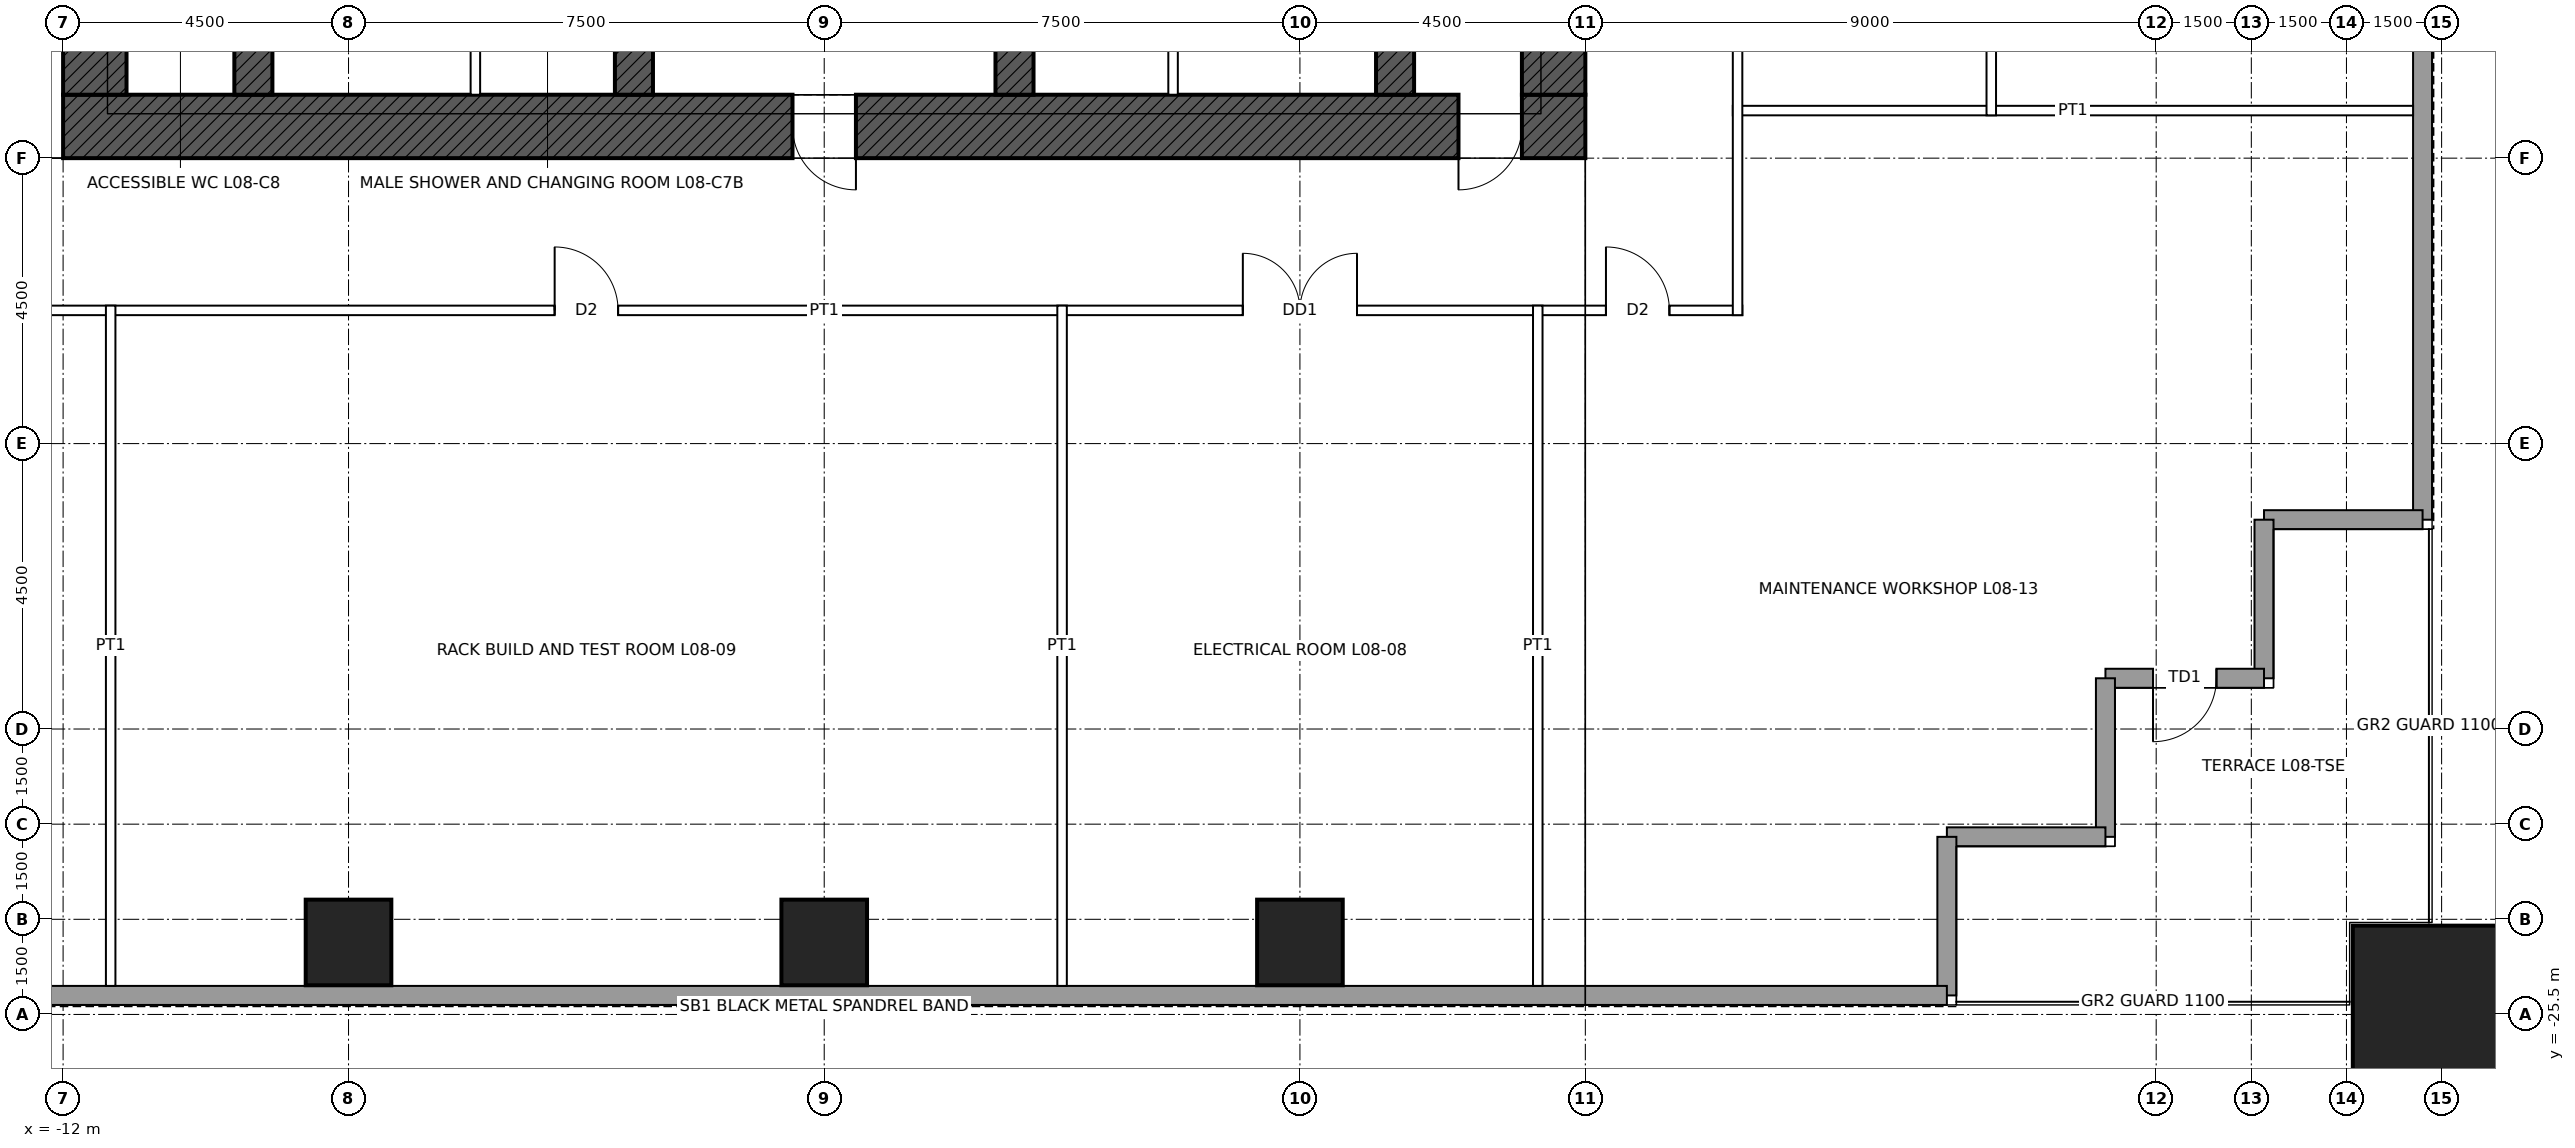
"""IFC4 building model, lengths in metres.
Left out: names, types, materials, properties, quantities, classifications, styles, units other than length and angle.
Written with IfcOpenShell. Run it as: python <this file> out.ifc"""

import sys

from ifc_helpers import new_model, si_unit, direction, frame, frame_2d, origin, origin_2d, place, context, subcontext, project, spatial, rectangle, hollow_rectangle, extrude, element, fill, save


model = new_model("IFC4")
c1 = context("Model", 3, precision=1e-05, world=origin(), true_north=direction((0.0, 1.0)))
c2 = subcontext(c1, "Body", "Model", "MODEL_VIEW")
j1 = project(units=[si_unit("LENGTHUNIT", "METRE"), si_unit("PLANEANGLEUNIT", "RADIAN")], contexts=[c1])
p1 = place(None, origin())
s1 = spatial("IfcSite", under=j1, at=p1, CompositionType="ELEMENT")
p2 = place(p1, origin())
s2 = spatial("IfcBuilding", under=s1, at=p2, CompositionType="ELEMENT")
p3 = place(p2, frame((0.0, 0.0, 43.4)))
s3 = spatial("IfcBuildingStorey", under=s2, at=p3, CompositionType="ELEMENT", Elevation=43.4)
p4 = place(p3, frame((25.5, -25.5, 0.0), z_axis=(0.0, 0.0, 1.0), x_axis=(1.0, 0.0, 0.0)))
e1 = element("IfcColumn", 1, at=p4, inside=s3, PredefinedType="COLUMN", context=c2, shape_type="SweptSolid", body=[
    extrude(hollow_rectangle(XDim=2.8, YDim=2.8, WallThickness=0.14, at=origin_2d()), origin(), (0.0, 0.0, 1.0), 5.0),
])
for number, where, z_axis, x_axis in (
    (2, (7.5, -24.365, 0.0), (0.0, 0.0, 1.0), (1.0, 0.0, 0.0)),
    (3, (0.0, -24.365, 0.0), (0.0, 0.0, 1.0), (1.0, 0.0, 0.0)),
    (4, (-7.5, -24.365, 0.0), (0.0, 0.0, 1.0), (1.0, 0.0, 0.0)),
):
    element("IfcColumn", number, at=place(p3, frame(where, z_axis=z_axis, x_axis=x_axis)), inside=s3, PredefinedType="COLUMN", context=c2, shape_type="SweptSolid", body=[
        extrude(hollow_rectangle(XDim=1.35, YDim=1.35, WallThickness=0.085, at=origin_2d()), origin(), (0.0, 0.0, 1.0), 5.0),
    ])
p5 = place(p3, frame((12.0, -11.5, 0.0), z_axis=(0.0, 0.0, 1.0), x_axis=(-1.0, 0.0, 0.0)))
e5 = element("IfcWall", 5, at=p5, inside=s3, PredefinedType="SHEAR", context=c2, shape_type="SweptSolid", body=[
    extrude(rectangle(XDim=24.0, YDim=1.0, at=frame_2d((12.0, 0.0))), origin(), (0.0, 0.0, 1.0), 5.0),
])
p6 = place(p5, frame((11.5, 0.0, 0.0)))
e6 = element("IfcOpeningElement", 6, at=p6, cuts=e5, PredefinedType="OPENING", context=c2, shape_type="SweptSolid", body=[
    extrude(rectangle(XDim=1.0, YDim=2.1, at=frame_2d((0.5, 1.05))), frame((0.0, 0.51, 0.0), z_axis=(0.0, -1.0, 0.0), x_axis=(1.0, 0.0, 0.0)), (0.0, 0.0, 1.0), 1.02),
])
p7 = place(p5, frame((1.0, 0.0, 0.0)))
e7 = element("IfcOpeningElement", 7, at=p7, cuts=e5, PredefinedType="OPENING", context=c2, shape_type="SweptSolid", body=[
    extrude(rectangle(XDim=1.0, YDim=2.4, at=frame_2d((0.5, 1.2))), frame((0.0, 0.51, 0.0), z_axis=(0.0, -1.0, 0.0), x_axis=(1.0, 0.0, 0.0)), (0.0, 0.0, 1.0), 1.02),
])
p8 = place(p3, frame((11.5, 11.0, 0.0), z_axis=(0.0, 0.0, 1.0), x_axis=(0.0, -1.0, 0.0)))
e8 = element("IfcWall", 8, at=p8, inside=s3, PredefinedType="SHEAR", context=c2, shape_type="SweptSolid", body=[
    extrude(rectangle(XDim=22.0, YDim=1.0, at=frame_2d((11.0, 0.0))), origin(), (0.0, 0.0, 1.0), 5.0),
])
p9 = place(p8, frame((10.5, 0.0, 0.0)))
e9 = element("IfcOpeningElement", 9, at=p9, cuts=e8, PredefinedType="OPENING", context=c2, shape_type="SweptSolid", body=[
    extrude(rectangle(XDim=1.0, YDim=2.4, at=frame_2d((0.5, 1.2))), frame((0.0, 0.51, 0.0), z_axis=(0.0, -1.0, 0.0), x_axis=(1.0, 0.0, 0.0)), (0.0, 0.0, 1.0), 1.02),
])
p10 = place(p3, frame((-11.5, -11.0, 0.0), z_axis=(0.0, 0.0, 1.0), x_axis=(0.0, 1.0, 0.0)))
e10 = element("IfcWall", 10, at=p10, inside=s3, PredefinedType="SHEAR", context=c2, shape_type="SweptSolid", body=[
    extrude(rectangle(XDim=22.0, YDim=1.0, at=frame_2d((11.0, 0.0))), origin(), (0.0, 0.0, 1.0), 5.0),
])
p11 = place(p10, frame((10.5, 0.0, 0.0)))
e11 = element("IfcOpeningElement", 11, at=p11, cuts=e10, PredefinedType="OPENING", context=c2, shape_type="SweptSolid", body=[
    extrude(rectangle(XDim=1.0, YDim=2.4, at=frame_2d((0.5, 1.2))), frame((0.0, 0.51, 0.0), z_axis=(0.0, -1.0, 0.0), x_axis=(1.0, 0.0, 0.0)), (0.0, 0.0, 1.0), 1.02),
])
p12 = place(p3, frame((-9.0, -11.0, 0.0), z_axis=(0.0, 0.0, 1.0), x_axis=(0.0, 1.0, 0.0)))
e12 = element("IfcWall", 12, at=p12, inside=s3, PredefinedType="SHEAR", context=c2, shape_type="SweptSolid", body=[
    extrude(rectangle(XDim=6.5, YDim=0.6, at=frame_2d((3.25, 0.0))), origin(), (0.0, 0.0, 1.0), 5.0),
])
p13 = place(p12, frame((4.25, 0.0, 0.0)))
e13 = element("IfcOpeningElement", 13, at=p13, cuts=e12, PredefinedType="OPENING", context=c2, shape_type="SweptSolid", body=[
    extrude(rectangle(XDim=1.0, YDim=2.1, at=frame_2d((0.5, 1.05))), frame((0.0, 0.31, 0.0), z_axis=(0.0, -1.0, 0.0), x_axis=(1.0, 0.0, 0.0)), (0.0, 0.0, 1.0), 0.62),
])
p14 = place(p3, frame((9.0, -11.0, 0.0), z_axis=(0.0, 0.0, 1.0), x_axis=(0.0, 1.0, 0.0)))
e14 = element("IfcWall", 14, at=p14, inside=s3, PredefinedType="SHEAR", context=c2, shape_type="SweptSolid", body=[
    extrude(rectangle(XDim=6.5, YDim=0.6, at=frame_2d((3.25, 0.0))), origin(), (0.0, 0.0, 1.0), 5.0),
])
p15 = place(p14, frame((4.25, 0.0, 0.0)))
e15 = element("IfcOpeningElement", 15, at=p15, cuts=e14, PredefinedType="OPENING", context=c2, shape_type="SweptSolid", body=[
    extrude(rectangle(XDim=1.0, YDim=2.1, at=frame_2d((0.5, 1.05))), frame((0.0, 0.31, 0.0), z_axis=(0.0, -1.0, 0.0), x_axis=(1.0, 0.0, 0.0)), (0.0, 0.0, 1.0), 0.62),
])
for number, where, z_axis, x_axis in (
    (16, (-3.0, -11.0, 0.0), (0.0, 0.0, 1.0), (0.0, 1.0, 0.0)),
    (17, (3.0, -11.0, 0.0), (0.0, 0.0, 1.0), (0.0, 1.0, 0.0)),
):
    element("IfcWall", number, at=place(p3, frame(where, z_axis=z_axis, x_axis=x_axis)), inside=s3, PredefinedType="SHEAR", context=c2, shape_type="SweptSolid", body=[
        extrude(rectangle(XDim=6.5, YDim=0.6, at=frame_2d((3.25, 0.0))), origin(), (0.0, 0.0, 1.0), 5.0),
    ])
p16 = place(p3, frame((25.2, 17.7, 0.0), z_axis=(0.0, 0.0, 1.0), x_axis=(0.0, -1.0, 0.0)))
e18 = element("IfcWall", 18, at=p16, inside=s3, PredefinedType="SOLIDWALL", context=c2, shape_type="SweptSolid", body=[
    extrude(rectangle(XDim=35.4, YDim=0.3, at=frame_2d((17.7, 0.0))), origin(), (0.0, 0.0, 1.0), 4.8),
])
for number, where, z_axis, x_axis in (
    (19, (25.2, -17.7, 0.0), (0.0, 0.0, 1.0), (-1.0, 0.0, 0.0)),
    (20, (22.7, -17.7, 0.0), (0.0, 0.0, 1.0), (0.0, -1.0, 0.0)),
):
    element("IfcWall", number, at=place(p3, frame(where, z_axis=z_axis, x_axis=x_axis)), inside=s3, PredefinedType="SOLIDWALL", context=c2, shape_type="SweptSolid", body=[
        extrude(rectangle(XDim=2.5, YDim=0.3, at=frame_2d((1.25, 0.0))), origin(), (0.0, 0.0, 1.0), 4.8),
    ])
p17 = place(p3, frame((22.7, -20.2, 0.0), z_axis=(0.0, 0.0, 1.0), x_axis=(-1.0, 0.0, 0.0)))
e21 = element("IfcWall", 21, at=p17, inside=s3, PredefinedType="SOLIDWALL", context=c2, shape_type="SweptSolid", body=[
    extrude(rectangle(XDim=2.5, YDim=0.3, at=frame_2d((1.25, 0.0))), origin(), (0.0, 0.0, 1.0), 4.8),
])
p18 = place(p17, frame((0.75, 0.0, 0.0)))
e22 = element("IfcOpeningElement", 22, at=p18, cuts=e21, PredefinedType="OPENING", context=c2, shape_type="SweptSolid", body=[
    extrude(rectangle(XDim=1.0, YDim=2.4, at=frame_2d((0.5, 1.2))), frame((0.0, 0.16, 0.0), z_axis=(0.0, -1.0, 0.0), x_axis=(1.0, 0.0, 0.0)), (0.0, 0.0, 1.0), 0.32),
])
for number, where, z_axis, x_axis in (
    (23, (20.2, -20.2, 0.0), (0.0, 0.0, 1.0), (0.0, -1.0, 0.0)),
    (24, (20.2, -22.7, 0.0), (0.0, 0.0, 1.0), (-1.0, 0.0, 0.0)),
    (25, (17.7, -22.7, 0.0), (0.0, 0.0, 1.0), (0.0, -1.0, 0.0)),
):
    element("IfcWall", number, at=place(p3, frame(where, z_axis=z_axis, x_axis=x_axis)), inside=s3, PredefinedType="SOLIDWALL", context=c2, shape_type="SweptSolid", body=[
        extrude(rectangle(XDim=2.5, YDim=0.3, at=frame_2d((1.25, 0.0))), origin(), (0.0, 0.0, 1.0), 4.8),
    ])
p19 = place(p3, frame((17.7, -25.2, 0.0), z_axis=(0.0, 0.0, 1.0), x_axis=(-1.0, 0.0, 0.0)))
e26 = element("IfcWall", 26, at=p19, inside=s3, PredefinedType="SOLIDWALL", context=c2, shape_type="SweptSolid", body=[
    extrude(rectangle(XDim=35.4, YDim=0.3, at=frame_2d((17.7, 0.0))), origin(), (0.0, 0.0, 1.0), 4.8),
])
p20 = place(p3, frame((-14.475, -14.4, 0.0), z_axis=(0.0, 0.0, 1.0), x_axis=(1.0, 0.0, 0.0)))
e27 = element("IfcWall", 27, at=p20, inside=s3, PredefinedType="PARTITIONING", context=c2, shape_type="SweptSolid", body=[
    extrude(rectangle(XDim=28.95, YDim=0.15, at=frame_2d((14.475, 0.0))), origin(), (0.0, 0.0, 1.0), 4.8),
])
p21 = place(p20, frame((21.075, 0.0, 0.0)))
e28 = element("IfcOpeningElement", 28, at=p21, cuts=e27, PredefinedType="OPENING", context=c2, shape_type="SweptSolid", body=[
    extrude(rectangle(XDim=1.8, YDim=2.4, at=frame_2d((0.9, 1.2))), frame((0.0, 0.085, 0.0), z_axis=(0.0, -1.0, 0.0), x_axis=(1.0, 0.0, 0.0)), (0.0, 0.0, 1.0), 0.17),
])
p22 = place(p20, frame((10.225, 0.0, 0.0)))
e29 = element("IfcOpeningElement", 29, at=p22, cuts=e27, PredefinedType="OPENING", context=c2, shape_type="SweptSolid", body=[
    extrude(rectangle(XDim=1.0, YDim=2.1, at=frame_2d((0.5, 1.05))), frame((0.0, 0.085, 0.0), z_axis=(0.0, -1.0, 0.0), x_axis=(1.0, 0.0, 0.0)), (0.0, 0.0, 1.0), 0.17),
])
p23 = place(p20, frame((26.8, 0.0, 0.0)))
e30 = element("IfcOpeningElement", 30, at=p23, cuts=e27, PredefinedType="OPENING", context=c2, shape_type="SweptSolid", body=[
    extrude(rectangle(XDim=1.0, YDim=2.1, at=frame_2d((0.5, 1.05))), frame((0.0, 0.085, 0.0), z_axis=(0.0, -1.0, 0.0), x_axis=(1.0, 0.0, 0.0)), (0.0, 0.0, 1.0), 0.17),
])
p24 = place(p20, frame((1.15, 0.0, 0.0)))
e31 = element("IfcOpeningElement", 31, at=p24, cuts=e27, PredefinedType="OPENING", context=c2, shape_type="SweptSolid", body=[
    extrude(rectangle(XDim=1.0, YDim=2.1, at=frame_2d((0.5, 1.05))), frame((0.0, 0.085, 0.0), z_axis=(0.0, -1.0, 0.0), x_axis=(1.0, 0.0, 0.0)), (0.0, 0.0, 1.0), 0.17),
])
for number, where, z_axis, x_axis in (
    (32, (14.325, -11.25, 0.0), (0.0, 0.0, 1.0), (1.0, 0.0, 0.0)),
    (33, (-11.25, -25.05, 0.0), (0.0, 0.0, 1.0), (0.0, 1.0, 0.0)),
    (34, (3.75, -25.05, 0.0), (0.0, 0.0, 1.0), (0.0, 1.0, 0.0)),
    (35, (11.25, -25.05, 0.0), (0.0, 0.0, 1.0), (0.0, 1.0, 0.0)),
):
    element("IfcWall", number, at=place(p3, frame(where, z_axis=z_axis, x_axis=x_axis)), inside=s3, PredefinedType="PARTITIONING", context=c2, shape_type="SweptSolid", body=[
        extrude(rectangle(XDim=10.725, YDim=0.15, at=frame_2d((5.363, 0.0))), origin(), (0.0, 0.0, 1.0), 3.853),
    ])
p25 = place(p3, frame((14.4, -14.475, 0.0), z_axis=(0.0, 0.0, 1.0), x_axis=(0.0, 1.0, 0.0)))
e36 = element("IfcWall", 36, at=p25, inside=s3, PredefinedType="PARTITIONING", context=c2, shape_type="SweptSolid", body=[
    extrude(rectangle(XDim=28.95, YDim=0.15, at=frame_2d((14.475, 0.0))), origin(), (0.0, 0.0, 1.0), 4.8),
])
p26 = place(p25, frame((21.075, 0.0, 0.0)))
e37 = element("IfcOpeningElement", 37, at=p26, cuts=e36, PredefinedType="OPENING", context=c2, shape_type="SweptSolid", body=[
    extrude(rectangle(XDim=1.8, YDim=2.4, at=frame_2d((0.9, 1.2))), frame((0.0, 0.085, 0.0), z_axis=(0.0, -1.0, 0.0), x_axis=(1.0, 0.0, 0.0)), (0.0, 0.0, 1.0), 0.17),
])
p27 = place(p25, frame((13.975, 0.0, 0.0)))
e38 = element("IfcOpeningElement", 38, at=p27, cuts=e36, PredefinedType="OPENING", context=c2, shape_type="SweptSolid", body=[
    extrude(rectangle(XDim=1.0, YDim=2.1, at=frame_2d((0.5, 1.05))), frame((0.0, 0.085, 0.0), z_axis=(0.0, -1.0, 0.0), x_axis=(1.0, 0.0, 0.0)), (0.0, 0.0, 1.0), 0.17),
])
p28 = place(p25, frame((6.075, 0.0, 0.0)))
e39 = element("IfcOpeningElement", 39, at=p28, cuts=e36, PredefinedType="OPENING", context=c2, shape_type="SweptSolid", body=[
    extrude(rectangle(XDim=1.8, YDim=2.4, at=frame_2d((0.9, 1.2))), frame((0.0, 0.085, 0.0), z_axis=(0.0, -1.0, 0.0), x_axis=(1.0, 0.0, 0.0)), (0.0, 0.0, 1.0), 0.17),
])
p29 = place(p3, frame((18.4, -11.325, 0.0), z_axis=(0.0, 0.0, 1.0), x_axis=(0.0, 1.0, 0.0)))
e40 = element("IfcWall", 40, at=p29, inside=s3, PredefinedType="PARTITIONING", context=c2, shape_type="SweptSolid", body=[
    extrude(rectangle(XDim=15.15, YDim=0.15, at=frame_2d((7.575, 0.0))), origin(), (0.0, 0.0, 1.0), 4.8),
])
p30 = place(p3, frame((-5.5, -11.0, 0.0), z_axis=(0.0, 0.0, 1.0), x_axis=(0.0, 1.0, 0.0)))
e41 = element("IfcWall", 41, at=p30, inside=s3, PredefinedType="PARTITIONING", context=c2, shape_type="SweptSolid", body=[
    extrude(rectangle(XDim=6.2, YDim=0.15, at=frame_2d((3.1, 0.0))), origin(), (0.0, 0.0, 1.0), 4.75),
])
p31 = place(p30, frame((2.6, 0.0, 0.0)))
e42 = element("IfcOpeningElement", 42, at=p31, cuts=e41, PredefinedType="OPENING", context=c2, shape_type="SweptSolid", body=[
    extrude(rectangle(XDim=1.0, YDim=2.1, at=frame_2d((0.5, 1.05))), frame((0.0, 0.085, 0.0), z_axis=(0.0, -1.0, 0.0), x_axis=(1.0, 0.0, 0.0)), (0.0, 0.0, 1.0), 0.17),
])
p32 = place(p3, frame((5.5, -11.0, 0.0), z_axis=(0.0, 0.0, 1.0), x_axis=(0.0, 1.0, 0.0)))
e43 = element("IfcWall", 43, at=p32, inside=s3, PredefinedType="PARTITIONING", context=c2, shape_type="SweptSolid", body=[
    extrude(rectangle(XDim=6.2, YDim=0.15, at=frame_2d((3.1, 0.0))), origin(), (0.0, 0.0, 1.0), 4.75),
])
p33 = place(p32, frame((2.6, 0.0, 0.0)))
e44 = element("IfcOpeningElement", 44, at=p33, cuts=e43, PredefinedType="OPENING", context=c2, shape_type="SweptSolid", body=[
    extrude(rectangle(XDim=1.0, YDim=2.1, at=frame_2d((0.5, 1.05))), frame((0.0, 0.085, 0.0), z_axis=(0.0, -1.0, 0.0), x_axis=(1.0, 0.0, 0.0)), (0.0, 0.0, 1.0), 0.17),
])
p34 = place(p18, origin())
e45 = element("IfcDoor", 45, at=p34, inside=s3, OperationType="SINGLE_SWING_RIGHT", PredefinedType="DOOR", context=c2, shape_type="SweptSolid", body=[
    extrude(rectangle(XDim=1.0, YDim=2.4, at=frame_2d((0.5, 1.2))), frame((0.0, 0.025, 0.0), z_axis=(0.0, -1.0, 0.0), x_axis=(1.0, 0.0, 0.0)), (0.0, 0.0, 1.0), 0.05),
])
fill(e22, e45)
p35 = place(p6, origin())
e46 = element("IfcDoor", 46, at=p35, inside=s3, OperationType="SINGLE_SWING_LEFT", PredefinedType="DOOR", context=c2, shape_type="SweptSolid", body=[
    extrude(rectangle(XDim=1.0, YDim=2.1, at=frame_2d((0.5, 1.05))), frame((0.0, 0.485, 0.0), z_axis=(0.0, -1.0, 0.0), x_axis=(1.0, 0.0, 0.0)), (0.0, 0.0, 1.0), 0.05),
])
fill(e6, e46)
p36 = place(p7, origin())
e47 = element("IfcDoor", 47, at=p36, inside=s3, OperationType="SINGLE_SWING_RIGHT", PredefinedType="DOOR", context=c2, shape_type="SweptSolid", body=[
    extrude(rectangle(XDim=1.0, YDim=2.4, at=frame_2d((0.5, 1.2))), frame((0.0, 0.485, 0.0), z_axis=(0.0, -1.0, 0.0), x_axis=(1.0, 0.0, 0.0)), (0.0, 0.0, 1.0), 0.05),
])
fill(e7, e47)
p37 = place(p21, origin())
e48 = element("IfcDoor", 48, at=p37, inside=s3, OperationType="DOUBLE_DOOR_SINGLE_SWING", PredefinedType="DOOR", context=c2, shape_type="SweptSolid", body=[
    extrude(rectangle(XDim=1.8, YDim=2.4, at=frame_2d((0.9, 1.2))), frame((0.0, 0.025, 0.0), z_axis=(0.0, -1.0, 0.0), x_axis=(1.0, 0.0, 0.0)), (0.0, 0.0, 1.0), 0.05),
])
fill(e28, e48)
p38 = place(p22, origin())
e49 = element("IfcDoor", 49, at=p38, inside=s3, OperationType="SINGLE_SWING_LEFT", PredefinedType="DOOR", context=c2, shape_type="SweptSolid", body=[
    extrude(rectangle(XDim=1.0, YDim=2.1, at=frame_2d((0.5, 1.05))), frame((0.0, 0.025, 0.0), z_axis=(0.0, -1.0, 0.0), x_axis=(1.0, 0.0, 0.0)), (0.0, 0.0, 1.0), 0.05),
])
fill(e29, e49)
p39 = place(p23, origin())
e50 = element("IfcDoor", 50, at=p39, inside=s3, OperationType="SINGLE_SWING_LEFT", PredefinedType="DOOR", context=c2, shape_type="SweptSolid", body=[
    extrude(rectangle(XDim=1.0, YDim=2.1, at=frame_2d((0.5, 1.05))), frame((0.0, 0.025, 0.0), z_axis=(0.0, -1.0, 0.0), x_axis=(1.0, 0.0, 0.0)), (0.0, 0.0, 1.0), 0.05),
])
fill(e30, e50)
save(model, sys.argv[1])
